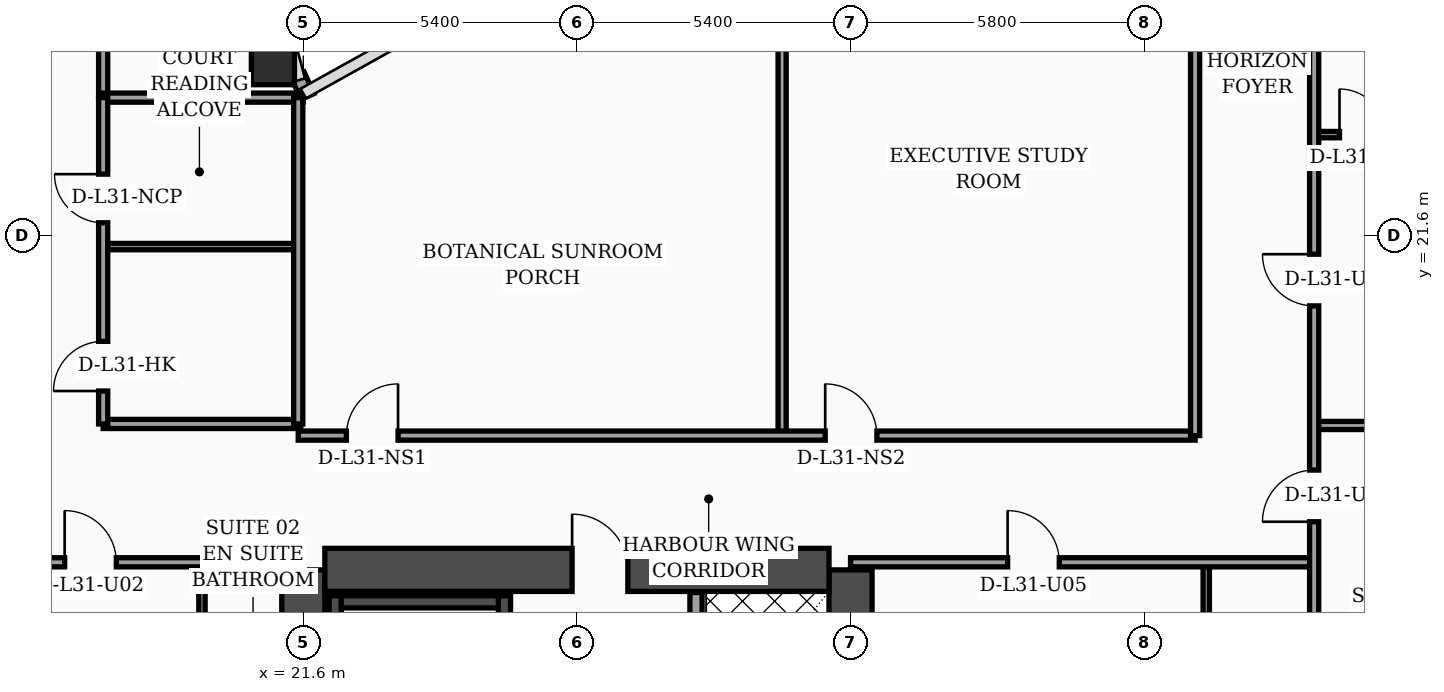
"""IFC4 building model, lengths in metres.
Left out: names, types, materials, properties, quantities, classifications, styles, units other than length and angle.
Written with IfcOpenShell. Run it as: python <this file> out.ifc"""

import sys

from ifc_helpers import new_model, si_unit, direction, frame, frame_2d, origin, origin_2d, place, context, subcontext, project, spatial, rectangle, hollow_rectangle, extrude, element, fill, save


model = new_model("IFC4")
c1 = context("Model", 3, precision=1e-05, world=origin(), true_north=direction((0.0, 1.0)))
c2 = subcontext(c1, "Body", "Model", "MODEL_VIEW")
j1 = project(units=[si_unit("LENGTHUNIT", "METRE"), si_unit("PLANEANGLEUNIT", "RADIAN")], contexts=[c1])
p1 = place(None, origin())
s1 = spatial("IfcSite", under=j1, at=p1, CompositionType="ELEMENT")
p2 = place(p1, origin())
s2 = spatial("IfcBuilding", under=s1, at=p2, CompositionType="ELEMENT")
p3 = place(p2, frame((0.0, 0.0, 127.8)))
s3 = spatial("IfcBuildingStorey", under=s2, at=p3, CompositionType="ELEMENT", Elevation=127.8)
for number, where, z_axis, x_axis in (
    (1, (21.6, 4.6, 0.0), (0.0, 0.0, 1.0), (0.0, 1.0, 0.0)),
    (2, (32.4, 4.6, 0.0), (0.0, 0.0, 1.0), (0.0, 1.0, 0.0)),
):
    element("IfcWall", number, at=place(p3, frame(where, z_axis=z_axis, x_axis=x_axis)), inside=s3, PredefinedType="SHEAR", context=c2, shape_type="SweptSolid", body=[
        extrude(rectangle(XDim=10.4, YDim=0.85, at=frame_2d((5.2, 0.0))), origin(), (0.0, 0.0, 1.0), 3.56),
    ])
p4 = place(p3, frame((22.025, 15.0, 0.0), z_axis=(0.0, 0.0, 1.0), x_axis=(1.0, 0.0, 0.0)))
e3 = element("IfcWall", 3, at=p4, inside=s3, PredefinedType="SHEAR", context=c2, shape_type="SweptSolid", body=[
    extrude(rectangle(XDim=9.95, YDim=0.85, at=frame_2d((4.975, 0.0))), origin(), (0.0, 0.0, 1.0), 3.56),
])
p5 = place(p4, frame((4.88, 0.0, 0.0)))
e4 = element("IfcOpeningElement", 4, at=p5, cuts=e3, PredefinedType="OPENING", context=c2, shape_type="SweptSolid", body=[
    extrude(rectangle(XDim=1.1, YDim=2.2, at=frame_2d((0.55, 1.1))), frame((0.0, 0.435, 0.0), z_axis=(0.0, -1.0, 0.0), x_axis=(1.0, 0.0, 0.0)), (0.0, 0.0, 1.0), 0.87),
])
p6 = place(p3, frame((22.23, 5.025, 0.0), z_axis=(0.0, 0.0, 1.0), x_axis=(0.0, 1.0, 0.0)))
e5 = element("IfcWall", 5, at=p6, inside=s3, PredefinedType="SOLIDWALL", context=c2, shape_type="SweptSolid", body=[
    extrude(rectangle(XDim=9.465, YDim=0.24, at=frame_2d((4.732, 0.0))), origin(), (0.0, 0.0, 1.0), 3.56),
])
p7 = place(p3, frame((25.57, 5.025, 0.0), z_axis=(0.0, 0.0, 1.0), x_axis=(0.0, 1.0, 0.0)))
e6 = element("IfcWall", 6, at=p7, inside=s3, PredefinedType="SOLIDWALL", context=c2, shape_type="SweptSolid", body=[
    extrude(rectangle(XDim=9.465, YDim=0.24, at=frame_2d((4.732, 0.0))), origin(), (0.0, 0.0, 1.0), 3.56),
])
p8 = place(p7, frame((0.35, 0.0, 0.0)))
e7 = element("IfcOpeningElement", 7, at=p8, cuts=e6, PredefinedType="OPENING", context=c2, shape_type="SweptSolid", body=[
    extrude(rectangle(XDim=1.15, YDim=2.2, at=frame_2d((0.575, 1.1))), frame((0.0, 0.13, 0.0), z_axis=(0.0, -1.0, 0.0), x_axis=(1.0, 0.0, 0.0)), (0.0, 0.0, 1.0), 0.26),
])
p9 = place(p3, frame((22.35, 14.37, 0.0), z_axis=(0.0, 0.0, 1.0), x_axis=(1.0, 0.0, 0.0)))
e8 = element("IfcWall", 8, at=p9, inside=s3, PredefinedType="SOLIDWALL", context=c2, shape_type="SweptSolid", body=[
    extrude(rectangle(XDim=3.1, YDim=0.24, at=frame_2d((1.55, 0.0))), origin(), (0.0, 0.0, 1.0), 3.56),
])
p10 = place(p3, frame((21.0, 25.0, 0.0), z_axis=(0.0, 0.0, 1.0), x_axis=(1.0, 0.0, 0.0)))
e9 = element("IfcColumn", 9, at=p10, inside=s3, PredefinedType="COLUMN", context=c2, shape_type="SweptSolid", body=[
    extrude(hollow_rectangle(XDim=0.85, YDim=0.85, WallThickness=0.036, at=origin_2d()), origin(), (0.0, 0.0, 1.0), 3.56),
])
p11 = place(p3, frame((21.68, 24.34, 0.0), z_axis=(0.0, 0.0, 1.0), x_axis=(-0.40758134973, 0.913168901875, 0.0)))
e10 = element("IfcWall", 10, at=p11, inside=s3, PredefinedType="SOLIDWALL", context=c2, shape_type="SweptSolid", body=[
    extrude(rectangle(XDim=0.471, YDim=0.28, at=frame_2d((0.235, 0.0))), origin(), (0.0, 0.0, 1.0), 3.56),
])
p12 = place(p3, frame((29.35, 5.045, 0.0), z_axis=(0.0, 0.0, 1.0), x_axis=(0.0, 1.0, 0.0)))
e11 = element("IfcWall", 11, at=p12, inside=s3, PredefinedType="SOLIDWALL", context=c2, shape_type="SweptSolid", body=[
    extrude(rectangle(XDim=9.51, YDim=0.24, at=frame_2d((4.755, 0.0))), origin(), (0.0, 0.0, 1.0), 3.56),
])
p13 = place(p12, frame((0.55, 0.0, 0.0)))
e12 = element("IfcOpeningElement", 12, at=p13, cuts=e11, PredefinedType="OPENING", context=c2, shape_type="SweptSolid", body=[
    extrude(rectangle(XDim=1.3, YDim=2.35, at=frame_2d((0.65, 1.175))), frame((0.0, 0.13, 0.0), z_axis=(0.0, -1.0, 0.0), x_axis=(1.0, 0.0, 0.0)), (0.0, 0.0, 1.0), 0.26),
])
p14 = place(p3, frame((19.6, 2.44, 0.0), z_axis=(0.0, 0.0, 1.0), x_axis=(0.0, 1.0, 0.0)))
e13 = element("IfcWall", 13, at=p14, inside=s3, PredefinedType="PARTITIONING", context=c2, shape_type="SweptSolid", body=[
    extrude(rectangle(XDim=12.71, YDim=0.125, at=frame_2d((6.355, 0.0))), origin(), (0.0, 0.0, 1.0), 2.49),
])
p15 = place(p14, frame((4.34, 0.0, 0.0)))
e14 = element("IfcOpeningElement", 14, at=p15, cuts=e13, PredefinedType="OPENING", context=c2, shape_type="SweptSolid", body=[
    extrude(rectangle(XDim=0.96, YDim=2.2, at=frame_2d((0.48, 1.1))), frame((0.0, 0.073, 0.0), z_axis=(0.0, -1.0, 0.0), x_axis=(1.0, 0.0, 0.0)), (0.0, 0.0, 1.0), 0.145),
])
p16 = place(p14, frame((10.18, 0.0, 0.0)))
e15 = element("IfcOpeningElement", 15, at=p16, cuts=e13, PredefinedType="OPENING", context=c2, shape_type="SweptSolid", body=[
    extrude(rectangle(XDim=0.9, YDim=2.15, at=frame_2d((0.45, 1.075))), frame((0.0, 0.073, 0.0), z_axis=(0.0, -1.0, 0.0), x_axis=(1.0, 0.0, 0.0)), (0.0, 0.0, 1.0), 0.145),
])
p17 = place(p3, frame((15.15, 15.15, 0.0), z_axis=(0.0, 0.0, 1.0), x_axis=(1.0, 0.0, 0.0)))
e16 = element("IfcWall", 16, at=p17, inside=s3, PredefinedType="PARTITIONING", context=c2, shape_type="SweptSolid", body=[
    extrude(rectangle(XDim=6.45, YDim=0.18, at=frame_2d((3.225, 0.0))), origin(), (0.0, 0.0, 1.0), 2.49),
])
p18 = place(p17, frame((1.74, 0.0, 0.0)))
e17 = element("IfcOpeningElement", 17, at=p18, cuts=e16, PredefinedType="OPENING", context=c2, shape_type="SweptSolid", body=[
    extrude(rectangle(XDim=1.02, YDim=2.2, at=frame_2d((0.51, 1.1))), frame((0.0, 0.1, 0.0), z_axis=(0.0, -1.0, 0.0), x_axis=(1.0, 0.0, 0.0)), (0.0, 0.0, 1.0), 0.2),
])
p19 = place(p3, frame((17.65, 24.3, 0.0), z_axis=(0.0, 0.0, 1.0), x_axis=(0.0, 1.0, 0.0)))
e18 = element("IfcWall", 18, at=p19, inside=s3, PredefinedType="PARTITIONING", context=c2, shape_type="SweptSolid", body=[
    extrude(rectangle(XDim=17.65, YDim=0.18, at=frame_2d((8.825, 0.0))), origin(), (0.0, 0.0, 1.0), 2.84),
])
p20 = place(p3, frame((17.65, 17.88, 0.0), z_axis=(0.0, 0.0, 1.0), x_axis=(1.0, 0.0, 0.0)))
e19 = element("IfcWall", 19, at=p20, inside=s3, PredefinedType="PARTITIONING", context=c2, shape_type="SweptSolid", body=[
    extrude(rectangle(XDim=3.9, YDim=0.18, at=frame_2d((1.95, 0.0))), origin(), (0.0, 0.0, 1.0), 3.09),
])
p21 = place(p3, frame((17.65, 21.38, 0.0), z_axis=(0.0, 0.0, 1.0), x_axis=(1.0, 0.0, 0.0)))
e20 = element("IfcWall", 20, at=p21, inside=s3, PredefinedType="PARTITIONING", context=c2, shape_type="SweptSolid", body=[
    extrude(rectangle(XDim=3.9, YDim=0.125, at=frame_2d((1.95, 0.0))), origin(), (0.0, 0.0, 1.0), 3.56),
])
p22 = place(p3, frame((17.65, 24.32, 0.0), z_axis=(0.0, 0.0, 1.0), x_axis=(1.0, 0.0, 0.0)))
e21 = element("IfcWall", 21, at=p22, inside=s3, PredefinedType="PARTITIONING", context=c2, shape_type="SweptSolid", body=[
    extrude(rectangle(XDim=3.95, YDim=0.18, at=frame_2d((1.975, 0.0))), origin(), (0.0, 0.0, 1.0), 3.56),
])
p23 = place(p3, frame((21.5, 17.88, 0.0), z_axis=(0.0, 0.0, 1.0), x_axis=(0.0, 1.0, 0.0)))
e22 = element("IfcWall", 22, at=p23, inside=s3, PredefinedType="PARTITIONING", context=c2, shape_type="SweptSolid", body=[
    extrude(rectangle(XDim=6.44, YDim=0.18, at=frame_2d((3.22, 0.0))), origin(), (0.0, 0.0, 1.0), 3.09),
])
p24 = place(p3, frame((17.65, 17.88, 0.0), z_axis=(0.0, 0.0, 1.0), x_axis=(0.0, 1.0, 0.0)))
e23 = element("IfcWall", 23, at=p24, inside=s3, PredefinedType="PARTITIONING", context=c2, shape_type="SweptSolid", body=[
    extrude(rectangle(XDim=6.44, YDim=0.18, at=frame_2d((3.22, 0.0))), origin(), (0.0, 0.0, 1.0), 3.09),
])
p25 = place(p24, frame((0.65, 0.0, 0.0)))
e24 = element("IfcOpeningElement", 24, at=p25, cuts=e23, PredefinedType="OPENING", context=c2, shape_type="SweptSolid", body=[
    extrude(rectangle(XDim=0.98, YDim=2.15, at=frame_2d((0.49, 1.075))), frame((0.0, 0.1, 0.0), z_axis=(0.0, -1.0, 0.0), x_axis=(1.0, 0.0, 0.0)), (0.0, 0.0, 1.0), 0.2),
])
p26 = place(p24, frame((3.97, 0.0, 0.0)))
e25 = element("IfcOpeningElement", 25, at=p26, cuts=e23, PredefinedType="OPENING", context=c2, shape_type="SweptSolid", body=[
    extrude(rectangle(XDim=0.96, YDim=2.2, at=frame_2d((0.48, 1.1))), frame((0.0, 0.1, 0.0), z_axis=(0.0, -1.0, 0.0), x_axis=(1.0, 0.0, 0.0)), (0.0, 0.0, 1.0), 0.2),
])
p27 = place(p3, frame((39.42, 2.44, 0.0), z_axis=(0.0, 0.0, 1.0), x_axis=(0.0, 1.0, 0.0)))
e26 = element("IfcWall", 26, at=p27, inside=s3, PredefinedType="PARTITIONING", context=c2, shape_type="SweptSolid", body=[
    extrude(rectangle(XDim=12.71, YDim=0.125, at=frame_2d((6.355, 0.0))), origin(), (0.0, 0.0, 1.0), 2.84),
])
p28 = place(p27, frame((4.35, 0.0, 0.0)))
e27 = element("IfcOpeningElement", 27, at=p28, cuts=e26, PredefinedType="OPENING", context=c2, shape_type="SweptSolid", body=[
    extrude(rectangle(XDim=0.96, YDim=2.2, at=frame_2d((0.48, 1.1))), frame((0.0, 0.073, 0.0), z_axis=(0.0, -1.0, 0.0), x_axis=(1.0, 0.0, 0.0)), (0.0, 0.0, 1.0), 0.145),
])
p29 = place(p27, frame((10.21, 0.0, 0.0)))
e28 = element("IfcOpeningElement", 28, at=p29, cuts=e26, PredefinedType="OPENING", context=c2, shape_type="SweptSolid", body=[
    extrude(rectangle(XDim=0.9, YDim=2.15, at=frame_2d((0.45, 1.075))), frame((0.0, 0.073, 0.0), z_axis=(0.0, -1.0, 0.0), x_axis=(1.0, 0.0, 0.0)), (0.0, 0.0, 1.0), 0.145),
])
p30 = place(p3, frame((32.4, 15.15, 0.0), z_axis=(0.0, 0.0, 1.0), x_axis=(1.0, 0.0, 0.0)))
e29 = element("IfcWall", 29, at=p30, inside=s3, PredefinedType="PARTITIONING", context=c2, shape_type="SweptSolid", body=[
    extrude(rectangle(XDim=9.15, YDim=0.18, at=frame_2d((4.575, 0.0))), origin(), (0.0, 0.0, 1.0), 2.84),
])
p31 = place(p30, frame((3.1, 0.0, 0.0)))
e30 = element("IfcOpeningElement", 30, at=p31, cuts=e29, PredefinedType="OPENING", context=c2, shape_type="SweptSolid", body=[
    extrude(rectangle(XDim=1.02, YDim=2.2, at=frame_2d((0.51, 1.1))), frame((0.0, 0.1, 0.0), z_axis=(0.0, -1.0, 0.0), x_axis=(1.0, 0.0, 0.0)), (0.0, 0.0, 1.0), 0.2),
])
p32 = place(p3, frame((31.05, 17.65, 0.0), z_axis=(0.0, 0.0, 1.0), x_axis=(0.0, 1.0, 0.0)))
e31 = element("IfcWall", 31, at=p32, inside=s3, PredefinedType="PARTITIONING", context=c2, shape_type="SweptSolid", body=[
    extrude(rectangle(XDim=12.1, YDim=0.16, at=frame_2d((6.05, 0.0))), origin(), (0.0, 0.0, 1.0), 2.84),
])
p33 = place(p3, frame((21.5, 17.65, 0.0), z_axis=(0.0, 0.0, 1.0), x_axis=(1.0, 0.0, 0.0)))
e32 = element("IfcWall", 32, at=p33, inside=s3, PredefinedType="PARTITIONING", context=c2, shape_type="SweptSolid", body=[
    extrude(rectangle(XDim=17.7, YDim=0.18, at=frame_2d((8.85, 0.0))), origin(), (0.0, 0.0, 1.0), 2.84),
])
p34 = place(p33, frame((0.95, 0.0, 0.0)))
e33 = element("IfcOpeningElement", 33, at=p34, cuts=e32, PredefinedType="OPENING", context=c2, shape_type="SweptSolid", body=[
    extrude(rectangle(XDim=1.02, YDim=2.2, at=frame_2d((0.51, 1.1))), frame((0.0, 0.1, 0.0), z_axis=(0.0, -1.0, 0.0), x_axis=(1.0, 0.0, 0.0)), (0.0, 0.0, 1.0), 0.2),
])
p35 = place(p33, frame((10.4, 0.0, 0.0)))
e34 = element("IfcOpeningElement", 34, at=p35, cuts=e32, PredefinedType="OPENING", context=c2, shape_type="SweptSolid", body=[
    extrude(rectangle(XDim=1.02, YDim=2.2, at=frame_2d((0.51, 1.1))), frame((0.0, 0.1, 0.0), z_axis=(0.0, -1.0, 0.0), x_axis=(1.0, 0.0, 0.0)), (0.0, 0.0, 1.0), 0.2),
])
p36 = place(p3, frame((39.2, 17.65, 0.0), z_axis=(0.0, 0.0, 1.0), x_axis=(0.0, 1.0, 0.0)))
e35 = element("IfcWall", 35, at=p36, inside=s3, PredefinedType="PARTITIONING", context=c2, shape_type="SweptSolid", body=[
    extrude(rectangle(XDim=16.64, YDim=0.18, at=frame_2d((8.32, 0.0))), origin(), (0.0, 0.0, 1.0), 2.84),
])
p37 = place(p3, frame((41.55, 23.59, 0.0), z_axis=(0.0, 0.0, 1.0), x_axis=(1.0, 0.0, 0.0)))
e36 = element("IfcWall", 36, at=p37, inside=s3, PredefinedType="PARTITIONING", context=c2, shape_type="SweptSolid", body=[
    extrude(rectangle(XDim=11.92, YDim=0.125, at=frame_2d((5.96, 0.0))), origin(), (0.0, 0.0, 1.0), 2.84),
])
p38 = place(p37, frame((0.5, 0.0, 0.0)))
e37 = element("IfcOpeningElement", 37, at=p38, cuts=e36, PredefinedType="OPENING", context=c2, shape_type="SweptSolid", body=[
    extrude(rectangle(XDim=0.9, YDim=2.15, at=frame_2d((0.45, 1.075))), frame((0.0, 0.073, 0.0), z_axis=(0.0, -1.0, 0.0), x_axis=(1.0, 0.0, 0.0)), (0.0, 0.0, 1.0), 0.145),
])
p39 = place(p37, frame((3.6, 0.0, 0.0)))
e38 = element("IfcOpeningElement", 38, at=p39, cuts=e36, PredefinedType="OPENING", context=c2, shape_type="SweptSolid", body=[
    extrude(rectangle(XDim=0.96, YDim=2.2, at=frame_2d((0.48, 1.1))), frame((0.0, 0.073, 0.0), z_axis=(0.0, -1.0, 0.0), x_axis=(1.0, 0.0, 0.0)), (0.0, 0.0, 1.0), 0.145),
])
p40 = place(p3, frame((41.55, 17.85, 0.0), z_axis=(0.0, 0.0, 1.0), x_axis=(1.0, 0.0, 0.0)))
e39 = element("IfcWall", 39, at=p40, inside=s3, PredefinedType="PARTITIONING", context=c2, shape_type="SweptSolid", body=[
    extrude(rectangle(XDim=13.73, YDim=0.16, at=frame_2d((6.865, 0.0))), origin(), (0.0, 0.0, 1.0), 2.84),
])
p41 = place(p3, frame((41.55, 2.44, 0.0), z_axis=(0.0, 0.0, 1.0), x_axis=(0.0, 1.0, 0.0)))
e40 = element("IfcWall", 40, at=p41, inside=s3, PredefinedType="PARTITIONING", context=c2, shape_type="SweptSolid", body=[
    extrude(rectangle(XDim=31.04, YDim=0.18, at=frame_2d((15.52, 0.0))), origin(), (0.0, 0.0, 1.0), 2.84),
])
p42 = place(p41, frame((13.51, 0.0, 0.0)))
e41 = element("IfcOpeningElement", 41, at=p42, cuts=e40, PredefinedType="OPENING", context=c2, shape_type="SweptSolid", body=[
    extrude(rectangle(XDim=1.02, YDim=2.2, at=frame_2d((0.51, 1.1))), frame((0.0, 0.1, 0.0), z_axis=(0.0, -1.0, 0.0), x_axis=(1.0, 0.0, 0.0)), (0.0, 0.0, 1.0), 0.2),
])
p43 = place(p41, frame((17.77, 0.0, 0.0)))
e42 = element("IfcOpeningElement", 42, at=p43, cuts=e40, PredefinedType="OPENING", context=c2, shape_type="SweptSolid", body=[
    extrude(rectangle(XDim=1.02, YDim=2.2, at=frame_2d((0.51, 1.1))), frame((0.0, 0.1, 0.0), z_axis=(0.0, -1.0, 0.0), x_axis=(1.0, 0.0, 0.0)), (0.0, 0.0, 1.0), 0.2),
])
p44 = place(p41, frame((25.58, 0.0, 0.0)))
e43 = element("IfcOpeningElement", 43, at=p44, cuts=e40, PredefinedType="OPENING", context=c2, shape_type="SweptSolid", body=[
    extrude(rectangle(XDim=1.02, YDim=2.2, at=frame_2d((0.51, 1.1))), frame((0.0, 0.1, 0.0), z_axis=(0.0, -1.0, 0.0), x_axis=(1.0, 0.0, 0.0)), (0.0, 0.0, 1.0), 0.2),
])
p45 = place(p18, origin())
e44 = element("IfcDoor", 44, at=p45, inside=s3, OperationType="SINGLE_SWING_LEFT", PredefinedType="DOOR", context=c2, shape_type="SweptSolid", body=[
    extrude(rectangle(XDim=1.02, YDim=2.2, at=frame_2d((0.51, 1.1))), frame((0.0, 0.025, 0.0), z_axis=(0.0, -1.0, 0.0), x_axis=(1.0, 0.0, 0.0)), (0.0, 0.0, 1.0), 0.05),
])
fill(e17, e44)
p46 = place(p25, origin())
e45 = element("IfcDoor", 45, at=p46, inside=s3, OperationType="SINGLE_SWING_LEFT", PredefinedType="DOOR", context=c2, shape_type="SweptSolid", body=[
    extrude(rectangle(XDim=0.98, YDim=2.15, at=frame_2d((0.49, 1.075))), frame((0.0, 0.025, 0.0), z_axis=(0.0, -1.0, 0.0), x_axis=(1.0, 0.0, 0.0)), (0.0, 0.0, 1.0), 0.05),
])
fill(e24, e45)
p47 = place(p26, origin())
e46 = element("IfcDoor", 46, at=p47, inside=s3, OperationType="SINGLE_SWING_RIGHT", PredefinedType="DOOR", context=c2, shape_type="SweptSolid", body=[
    extrude(rectangle(XDim=0.96, YDim=2.2, at=frame_2d((0.48, 1.1))), frame((0.0, 0.025, 0.0), z_axis=(0.0, -1.0, 0.0), x_axis=(1.0, 0.0, 0.0)), (0.0, 0.0, 1.0), 0.05),
])
fill(e25, e46)
p48 = place(p31, origin())
e47 = element("IfcDoor", 47, at=p48, inside=s3, OperationType="SINGLE_SWING_LEFT", PredefinedType="DOOR", context=c2, shape_type="SweptSolid", body=[
    extrude(rectangle(XDim=1.02, YDim=2.2, at=frame_2d((0.51, 1.1))), frame((0.0, 0.025, 0.0), z_axis=(0.0, -1.0, 0.0), x_axis=(1.0, 0.0, 0.0)), (0.0, 0.0, 1.0), 0.05),
])
fill(e30, e47)
p49 = place(p34, origin())
e48 = element("IfcDoor", 48, at=p49, inside=s3, OperationType="SINGLE_SWING_RIGHT", PredefinedType="DOOR", context=c2, shape_type="SweptSolid", body=[
    extrude(rectangle(XDim=1.02, YDim=2.2, at=frame_2d((0.51, 1.1))), frame((0.0, 0.025, 0.0), z_axis=(0.0, -1.0, 0.0), x_axis=(1.0, 0.0, 0.0)), (0.0, 0.0, 1.0), 0.05),
])
fill(e33, e48)
p50 = place(p35, origin())
e49 = element("IfcDoor", 49, at=p50, inside=s3, OperationType="SINGLE_SWING_LEFT", PredefinedType="DOOR", context=c2, shape_type="SweptSolid", body=[
    extrude(rectangle(XDim=1.02, YDim=2.2, at=frame_2d((0.51, 1.1))), frame((0.0, 0.025, 0.0), z_axis=(0.0, -1.0, 0.0), x_axis=(1.0, 0.0, 0.0)), (0.0, 0.0, 1.0), 0.05),
])
fill(e34, e49)
p51 = place(p38, origin())
e50 = element("IfcDoor", 50, at=p51, inside=s3, OperationType="SINGLE_SWING_LEFT", PredefinedType="DOOR", context=c2, shape_type="SweptSolid", body=[
    extrude(rectangle(XDim=0.9, YDim=2.15, at=frame_2d((0.45, 1.075))), frame((0.0, 0.025, 0.0), z_axis=(0.0, -1.0, 0.0), x_axis=(1.0, 0.0, 0.0)), (0.0, 0.0, 1.0), 0.05),
])
fill(e37, e50)
p52 = place(p42, origin())
e51 = element("IfcDoor", 51, at=p52, inside=s3, OperationType="SINGLE_SWING_LEFT", PredefinedType="DOOR", context=c2, shape_type="SweptSolid", body=[
    extrude(rectangle(XDim=1.02, YDim=2.2, at=frame_2d((0.51, 1.1))), frame((0.0, 0.025, 0.0), z_axis=(0.0, -1.0, 0.0), x_axis=(1.0, 0.0, 0.0)), (0.0, 0.0, 1.0), 0.05),
])
fill(e41, e51)
p53 = place(p43, origin())
e52 = element("IfcDoor", 52, at=p53, inside=s3, OperationType="SINGLE_SWING_RIGHT", PredefinedType="DOOR", context=c2, shape_type="SweptSolid", body=[
    extrude(rectangle(XDim=1.02, YDim=2.2, at=frame_2d((0.51, 1.1))), frame((0.0, 0.025, 0.0), z_axis=(0.0, -1.0, 0.0), x_axis=(1.0, 0.0, 0.0)), (0.0, 0.0, 1.0), 0.05),
])
fill(e42, e52)
p54 = place(p5, origin())
e53 = element("IfcDoor", 53, at=p54, inside=s3, OperationType="SINGLE_SWING_LEFT", PredefinedType="DOOR", context=c2, shape_type="SweptSolid", body=[
    extrude(rectangle(XDim=1.1, YDim=2.2, at=frame_2d((0.55, 1.1))), frame((0.0, 0.025, 0.0), z_axis=(0.0, -1.0, 0.0), x_axis=(1.0, 0.0, 0.0)), (0.0, 0.0, 1.0), 0.05),
])
fill(e4, e53)
save(model, sys.argv[1])
